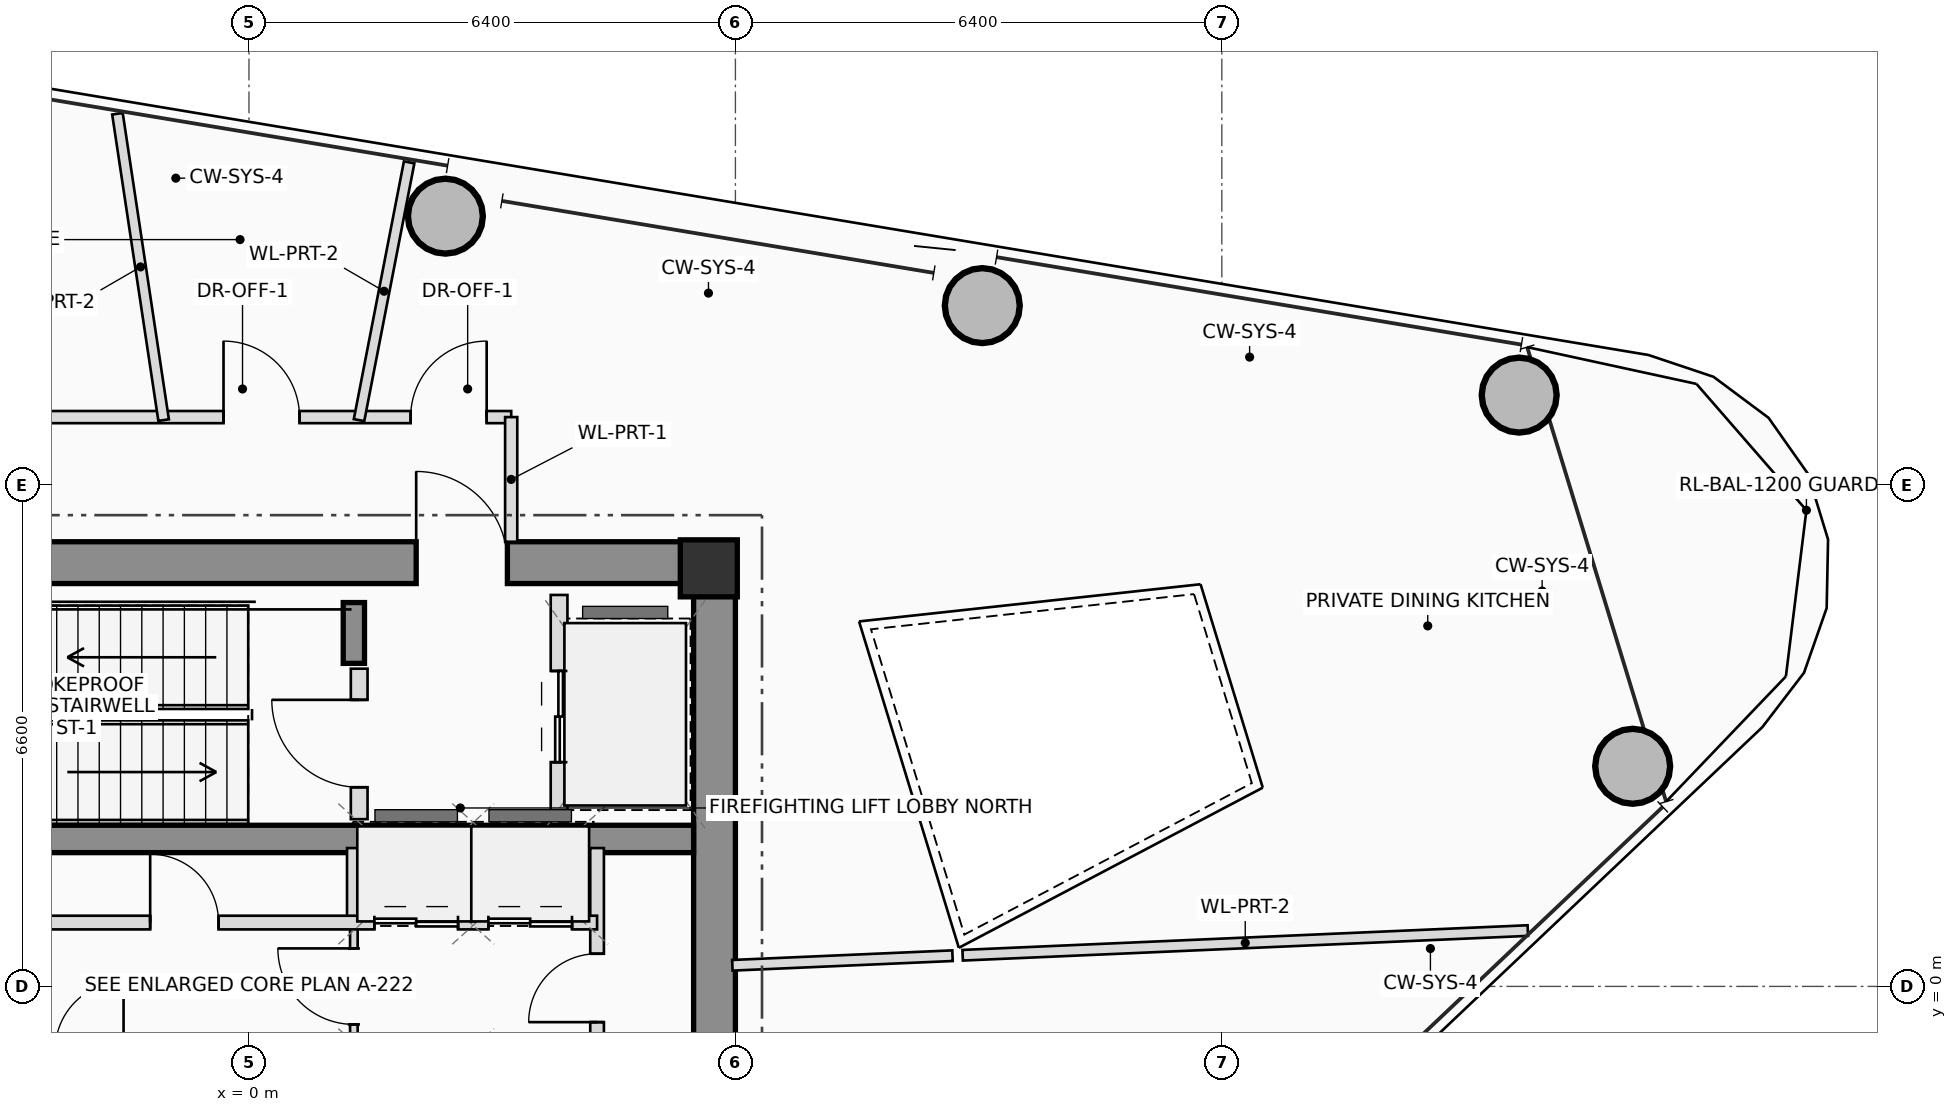
"""IFC4 building model, lengths in metres.
Left out: names, types, materials, properties, quantities, classifications, styles, units other than length and angle.
Written with IfcOpenShell. Run it as: python <this file> out.ifc"""

import sys

from ifc_helpers import new_model, si_unit, direction, frame, frame_2d, origin, origin_2d, place, context, subcontext, project, spatial, rectangle, hollow_circle, extrude, source, transform, mapped, element, fill, save


model = new_model("IFC4")
c1 = context("Model", 3, precision=1e-05, world=origin(), true_north=direction((0.0, 1.0)))
c2 = subcontext(c1, "Body", "Model", "MODEL_VIEW")
j1 = project(units=[si_unit("LENGTHUNIT", "METRE"), si_unit("PLANEANGLEUNIT", "RADIAN")], contexts=[c1])
p1 = place(None, origin())
s1 = spatial("IfcSite", under=j1, at=p1, CompositionType="ELEMENT")
p2 = place(p1, origin())
s2 = spatial("IfcBuilding", under=s1, at=p2, CompositionType="ELEMENT")
p3 = place(p2, frame((0.0, 0.0, 242.25)))
s3 = spatial("IfcBuildingStorey", under=s2, at=p3, CompositionType="ELEMENT", Elevation=242.25)
m1 = source(origin(), c2, "Body", "SweptSolid", [
    extrude(rectangle(XDim=0.75, YDim=0.75, at=origin_2d()), origin(), (0.0, 0.0, 1.0), 3.4),
])
p4 = place(p3, frame((6.05, 5.5, 0.0), z_axis=(0.0, 0.0, 1.0), x_axis=(1.0, 0.0, 0.0)))
e1 = element("IfcColumn", 1, at=p4, inside=s3, PredefinedType="COLUMN", context=c2, shape_type="MappedRepresentation", body=[
    mapped(m1, transform((0.0, 0.0, 0.0), scale=1.0)),
])
p5 = place(p3, frame((-6.4, 5.575, 0.0), z_axis=(0.0, 0.0, 1.0), x_axis=(1.0, 0.0, 0.0)))
e2 = element("IfcWall", 2, at=p5, inside=s3, PredefinedType="SHEAR", context=c2, shape_type="SweptSolid", body=[
    extrude(rectangle(XDim=12.8, YDim=0.55, at=frame_2d((6.4, 0.0))), origin(), (0.0, 0.0, 1.0), 3.4),
])
p6 = place(p5, frame((8.6, 0.0, 0.0)))
e3 = element("IfcOpeningElement", 3, at=p6, cuts=e2, PredefinedType="OPENING", context=c2, shape_type="SweptSolid", body=[
    extrude(rectangle(XDim=1.2, YDim=2.2, at=frame_2d((0.6, 1.1))), frame((0.0, 0.285, 0.0), z_axis=(0.0, -1.0, 0.0), x_axis=(1.0, 0.0, 0.0)), (0.0, 0.0, 1.0), 0.57),
])
p7 = place(p3, frame((6.125, -5.3, 0.0), z_axis=(0.0, 0.0, 1.0), x_axis=(0.0, 1.0, 0.0)))
e4 = element("IfcWall", 4, at=p7, inside=s3, PredefinedType="SHEAR", context=c2, shape_type="SweptSolid", body=[
    extrude(rectangle(XDim=10.6, YDim=0.55, at=frame_2d((5.3, 0.0))), origin(), (0.0, 0.0, 1.0), 3.4),
])
p8 = place(p3, frame((-5.85, 1.94, 0.0), z_axis=(0.0, 0.0, 1.0), x_axis=(1.0, 0.0, 0.0)))
e5 = element("IfcWall", 5, at=p8, inside=s3, PredefinedType="SHEAR", context=c2, shape_type="SweptSolid", body=[
    extrude(rectangle(XDim=11.7, YDim=0.36, at=frame_2d((5.85, 0.0))), origin(), (0.0, 0.0, 1.0), 3.4),
])
p9 = place(p3, frame((1.38, 4.25, 0.0), z_axis=(0.0, 0.0, 1.0), x_axis=(0.0, 1.0, 0.0)))
e6 = element("IfcWall", 6, at=p9, inside=s3, PredefinedType="SHEAR", context=c2, shape_type="SweptSolid", body=[
    extrude(rectangle(XDim=0.8, YDim=0.28, at=frame_2d((0.4, 0.0))), origin(), (0.0, 0.0, 1.0), 3.4),
])
m2 = source(origin(), c2, "Body", "SweptSolid", [
    extrude(hollow_circle(Radius=0.5, WallThickness=0.04, at=origin_2d()), origin(), (0.0, 0.0, 1.0), 3.4),
])
for number, where, z_axis, x_axis in (
    (7, (18.205, 2.896, 0.0), (0.0, 0.0, 1.0), (1.0, 0.0, 0.0)),
    (8, (16.712, 7.779, 0.0), (0.0, 0.0, 1.0), (1.0, 0.0, 0.0)),
    (9, (9.648, 8.957, 0.0), (0.0, 0.0, 1.0), (1.0, 0.0, 0.0)),
    (10, (2.584, 10.134, 0.0), (0.0, 0.0, 1.0), (1.0, 0.0, 0.0)),
):
    element("IfcColumn", number, at=place(p3, frame(where, z_axis=z_axis, x_axis=x_axis)), inside=s3, PredefinedType="COLUMN", context=c2, shape_type="MappedRepresentation", body=[
        mapped(m2, transform((0.0, 0.0, 0.0), scale=1.0)),
    ])
p10 = place(p3, frame((1.45, 2.2, 0.0), z_axis=(0.0, 0.0, 1.0), x_axis=(0.0, 1.0, 0.0)))
e11 = element("IfcWall", 11, at=p10, inside=s3, PredefinedType="PLUMBINGWALL", context=c2, shape_type="SweptSolid", body=[
    extrude(rectangle(XDim=1.98, YDim=0.22, at=frame_2d((0.99, 0.0))), origin(), (0.0, 0.0, 1.0), 3.2),
])
p11 = place(p10, frame((0.42, 0.0, 0.0)))
e12 = element("IfcOpeningElement", 12, at=p11, cuts=e11, PredefinedType="OPENING", context=c2, shape_type="SweptSolid", body=[
    extrude(rectangle(XDim=1.15, YDim=2.15, at=frame_2d((0.575, 1.075))), frame((0.0, 0.12, 0.0), z_axis=(0.0, -1.0, 0.0), x_axis=(1.0, 0.0, 0.0)), (0.0, 0.0, 1.0), 0.24),
])
p12 = place(p3, frame((4.08, 2.2, 0.0), z_axis=(0.0, 0.0, 1.0), x_axis=(0.0, 1.0, 0.0)))
e13 = element("IfcWall", 13, at=p12, inside=s3, PredefinedType="PLUMBINGWALL", context=c2, shape_type="SweptSolid", body=[
    extrude(rectangle(XDim=2.95, YDim=0.22, at=frame_2d((1.475, 0.0))), origin(), (0.0, 0.0, 1.0), 3.2),
])
p13 = place(p12, frame((0.75, 0.0, 0.0)))
e14 = element("IfcOpeningElement", 14, at=p13, cuts=e13, PredefinedType="OPENING", context=c2, shape_type="SweptSolid", body=[
    extrude(rectangle(XDim=1.2, YDim=2.25, at=frame_2d((0.6, 1.125))), frame((0.0, 0.12, 0.0), z_axis=(0.0, -1.0, 0.0), x_axis=(1.0, 0.0, 0.0)), (0.0, 0.0, 1.0), 0.24),
])
p14 = place(p3, frame((1.38, -0.84, 0.0), z_axis=(0.0, 0.0, 1.0), x_axis=(0.0, 1.0, 0.0)))
e15 = element("IfcWall", 15, at=p14, inside=s3, PredefinedType="PARTITIONING", context=c2, shape_type="SweptSolid", body=[
    extrude(rectangle(XDim=1.68, YDim=0.1, at=frame_2d((0.84, 0.0))), origin(), (0.0, 0.0, 1.0), 3.2),
])
p15 = place(p14, frame((0.34, 0.0, 0.0)))
e16 = element("IfcOpeningElement", 16, at=p15, cuts=e15, PredefinedType="OPENING", context=c2, shape_type="SweptSolid", body=[
    extrude(rectangle(XDim=1.0, YDim=2.25, at=frame_2d((0.5, 1.125))), frame((0.0, 0.06, 0.0), z_axis=(0.0, -1.0, 0.0), x_axis=(1.0, 0.0, 0.0)), (0.0, 0.0, 1.0), 0.12),
])
for number, where, z_axis, x_axis in (
    (17, (1.38, 0.84, 0.0), (0.0, 0.0, 1.0), (0.0, 1.0, 0.0)),
    (18, (3.02, 0.84, 0.0), (0.0, 0.0, 1.0), (0.0, 1.0, 0.0)),
    (19, (4.38, 0.84, 0.0), (0.0, 0.0, 1.0), (0.0, 1.0, 0.0)),
):
    element("IfcWall", number, at=place(p3, frame(where, z_axis=z_axis, x_axis=x_axis)), inside=s3, PredefinedType="PLUMBINGWALL", context=c2, shape_type="SweptSolid", body=[
        extrude(rectangle(XDim=0.98, YDim=0.18, at=frame_2d((0.49, 0.0))), origin(), (0.0, 0.0, 1.0), 3.2),
    ])
p16 = place(p3, frame((4.58, -1.82, 0.0), z_axis=(0.0, 0.0, 1.0), x_axis=(0.0, 1.0, 0.0)))
e20 = element("IfcWall", 20, at=p16, inside=s3, PredefinedType="PLUMBINGWALL", context=c2, shape_type="SweptSolid", body=[
    extrude(rectangle(XDim=3.64, YDim=0.18, at=frame_2d((1.82, 0.0))), origin(), (0.0, 0.0, 1.0), 3.2),
])
p17 = place(p16, frame((1.35, 0.0, 0.0)))
e21 = element("IfcOpeningElement", 21, at=p17, cuts=e20, PredefinedType="OPENING", context=c2, shape_type="SweptSolid", body=[
    extrude(rectangle(XDim=0.9, YDim=2.05, at=frame_2d((0.45, 1.025))), frame((0.0, 0.1, 0.0), z_axis=(0.0, -1.0, 0.0), x_axis=(1.0, 0.0, 0.0)), (0.0, 0.0, 1.0), 0.2),
])
p18 = place(p3, frame((-5.68, 0.84, 0.0), z_axis=(0.0, 0.0, 1.0), x_axis=(1.0, 0.0, 0.0)))
e22 = element("IfcWall", 22, at=p18, inside=s3, PredefinedType="PLUMBINGWALL", context=c2, shape_type="SweptSolid", body=[
    extrude(rectangle(XDim=10.26, YDim=0.18, at=frame_2d((5.13, 0.0))), origin(), (0.0, 0.0, 1.0), 3.2),
])
p19 = place(p18, frame((0.91, 0.0, 0.0)))
e23 = element("IfcOpeningElement", 23, at=p19, cuts=e22, PredefinedType="OPENING", context=c2, shape_type="SweptSolid", body=[
    extrude(rectangle(XDim=0.9, YDim=2.05, at=frame_2d((0.45, 1.025))), frame((0.0, 0.1, 0.0), z_axis=(0.0, -1.0, 0.0), x_axis=(1.0, 0.0, 0.0)), (0.0, 0.0, 1.0), 0.2),
])
p20 = place(p18, frame((4.38, 0.0, 0.0)))
e24 = element("IfcOpeningElement", 24, at=p20, cuts=e22, PredefinedType="OPENING", context=c2, shape_type="SweptSolid", body=[
    extrude(rectangle(XDim=0.9, YDim=2.05, at=frame_2d((0.45, 1.025))), frame((0.0, 0.1, 0.0), z_axis=(0.0, -1.0, 0.0), x_axis=(1.0, 0.0, 0.0)), (0.0, 0.0, 1.0), 0.2),
])
p21 = place(p18, frame((7.33, 0.0, 0.0)))
e25 = element("IfcOpeningElement", 25, at=p21, cuts=e22, PredefinedType="OPENING", context=c2, shape_type="SweptSolid", body=[
    extrude(rectangle(XDim=1.1, YDim=2.2, at=frame_2d((0.55, 1.1))), frame((0.0, 0.1, 0.0), z_axis=(0.0, -1.0, 0.0), x_axis=(1.0, 0.0, 0.0)), (0.0, 0.0, 1.0), 0.2),
])
p22 = place(p18, frame((8.83, 0.0, 0.0)))
e26 = element("IfcOpeningElement", 26, at=p22, cuts=e22, PredefinedType="OPENING", context=c2, shape_type="SweptSolid", body=[
    extrude(rectangle(XDim=1.1, YDim=2.2, at=frame_2d((0.55, 1.1))), frame((0.0, 0.1, 0.0), z_axis=(0.0, -1.0, 0.0), x_axis=(1.0, 0.0, 0.0)), (0.0, 0.0, 1.0), 0.2),
])
p23 = place(p3, frame((-6.36, 7.49, 0.0), z_axis=(0.0, 0.0, 1.0), x_axis=(1.0, 0.0, 0.0)))
e27 = element("IfcWall", 27, at=p23, inside=s3, PredefinedType="PARTITIONING", context=c2, shape_type="SweptSolid", body=[
    extrude(rectangle(XDim=9.81, YDim=0.16, at=frame_2d((4.905, 0.0))), origin(), (0.0, 0.0, 1.0), 2.605),
])
p24 = place(p23, frame((6.025, 0.0, 0.0)))
e28 = element("IfcOpeningElement", 28, at=p24, cuts=e27, PredefinedType="OPENING", context=c2, shape_type="SweptSolid", body=[
    extrude(rectangle(XDim=1.0, YDim=2.25, at=frame_2d((0.5, 1.125))), frame((0.0, 0.09, 0.0), z_axis=(0.0, -1.0, 0.0), x_axis=(1.0, 0.0, 0.0)), (0.0, 0.0, 1.0), 0.18),
])
p25 = place(p23, frame((8.487, 0.0, 0.0)))
e29 = element("IfcOpeningElement", 29, at=p25, cuts=e27, PredefinedType="OPENING", context=c2, shape_type="SweptSolid", body=[
    extrude(rectangle(XDim=1.0, YDim=2.25, at=frame_2d((0.5, 1.125))), frame((0.0, 0.09, 0.0), z_axis=(0.0, -1.0, 0.0), x_axis=(1.0, 0.0, 0.0)), (0.0, 0.0, 1.0), 0.18),
])
p26 = place(p3, frame((3.45, 7.49, 0.0), z_axis=(0.0, 0.0, 1.0), x_axis=(0.0, -1.0, 0.0)))
e30 = element("IfcWall", 30, at=p26, inside=s3, PredefinedType="PARTITIONING", context=c2, shape_type="SweptSolid", body=[
    extrude(rectangle(XDim=1.64, YDim=0.16, at=frame_2d((0.82, 0.0))), origin(), (0.0, 0.0, 1.0), 3.2),
])
p27 = place(p3, frame((6.36, 0.278, 0.0), z_axis=(0.0, 0.0, 1.0), x_axis=(0.999048037217, 0.043623609819, 0.0)))
e31 = element("IfcWall", 31, at=p27, inside=s3, PredefinedType="PARTITIONING", context=c2, shape_type="SweptSolid", body=[
    extrude(rectangle(XDim=2.899, YDim=0.14, at=frame_2d((1.449, 0.0))), origin(), (0.0, 0.0, 1.0), 3.2),
])
p28 = place(p3, frame((9.39, 0.41, 0.0), z_axis=(0.0, 0.0, 1.0), x_axis=(0.999047971421, 0.043625116619, 0.0)))
e32 = element("IfcWall", 32, at=p28, inside=s3, PredefinedType="PARTITIONING", context=c2, shape_type="SweptSolid", body=[
    extrude(rectangle(XDim=7.443, YDim=0.14, at=frame_2d((3.722, 0.0))), origin(), (0.0, 0.0, 1.0), 2.605),
])
p29 = place(p3, frame((1.448, 7.45, 0.0), z_axis=(0.0, 0.0, 1.0), x_axis=(0.19085452876, 0.981618331558, 0.0)))
e33 = element("IfcWall", 33, at=p29, inside=s3, PredefinedType="PARTITIONING", context=c2, shape_type="SweptSolid", body=[
    extrude(rectangle(XDim=3.455, YDim=0.14, at=frame_2d((1.728, 0.0))), origin(), (0.0, 0.0, 1.0), 2.765),
])
p30 = place(p3, frame((-1.123, 7.45, 0.0), z_axis=(0.0, 0.0, 1.0), x_axis=(-0.149063767164, 0.988827585234, 0.0)))
e34 = element("IfcWall", 34, at=p30, inside=s3, PredefinedType="PARTITIONING", context=c2, shape_type="SweptSolid", body=[
    extrude(rectangle(XDim=4.077, YDim=0.14, at=frame_2d((2.038, 0.0))), origin(), (0.0, 0.0, 1.0), 2.765),
])
p31 = place(p6, origin())
e35 = element("IfcDoor", 35, at=p31, inside=s3, OperationType="SINGLE_SWING_LEFT", PredefinedType="DOOR", context=c2, shape_type="SweptSolid", body=[
    extrude(rectangle(XDim=1.2, YDim=2.2, at=frame_2d((0.6, 1.1))), frame((0.0, 0.025, 0.0), z_axis=(0.0, -1.0, 0.0), x_axis=(1.0, 0.0, 0.0)), (0.0, 0.0, 1.0), 0.05),
])
fill(e3, e35)
p32 = place(p11, origin())
e36 = element("IfcDoor", 36, at=p32, inside=s3, OperationType="SINGLE_SWING_RIGHT", PredefinedType="DOOR", context=c2, shape_type="SweptSolid", body=[
    extrude(rectangle(XDim=1.15, YDim=2.15, at=frame_2d((0.575, 1.075))), frame((0.0, 0.025, 0.0), z_axis=(0.0, -1.0, 0.0), x_axis=(1.0, 0.0, 0.0)), (0.0, 0.0, 1.0), 0.05),
])
fill(e12, e36)
p33 = place(p13, origin())
e37 = element("IfcDoor", 37, at=p33, inside=s3, OperationType="DOUBLE_DOOR_SLIDING", PredefinedType="DOOR", context=c2, shape_type="SweptSolid", body=[
    extrude(rectangle(XDim=1.2, YDim=2.25, at=frame_2d((0.6, 1.125))), frame((0.0, 0.025, 0.0), z_axis=(0.0, -1.0, 0.0), x_axis=(1.0, 0.0, 0.0)), (0.0, 0.0, 1.0), 0.05),
])
fill(e14, e37)
p34 = place(p15, origin())
e38 = element("IfcDoor", 38, at=p34, inside=s3, OperationType="SINGLE_SWING_RIGHT", PredefinedType="DOOR", context=c2, shape_type="SweptSolid", body=[
    extrude(rectangle(XDim=1.0, YDim=2.25, at=frame_2d((0.5, 1.125))), frame((0.0, 0.025, 0.0), z_axis=(0.0, -1.0, 0.0), x_axis=(1.0, 0.0, 0.0)), (0.0, 0.0, 1.0), 0.05),
])
fill(e16, e38)
p35 = place(p17, origin())
e39 = element("IfcDoor", 39, at=p35, inside=s3, OperationType="SINGLE_SWING_LEFT", PredefinedType="DOOR", context=c2, shape_type="SweptSolid", body=[
    extrude(rectangle(XDim=0.9, YDim=2.05, at=frame_2d((0.45, 1.025))), frame((0.0, 0.025, 0.0), z_axis=(0.0, -1.0, 0.0), x_axis=(1.0, 0.0, 0.0)), (0.0, 0.0, 1.0), 0.05),
])
fill(e21, e39)
p36 = place(p20, origin())
e40 = element("IfcDoor", 40, at=p36, inside=s3, OperationType="SINGLE_SWING_LEFT", PredefinedType="DOOR", context=c2, shape_type="SweptSolid", body=[
    extrude(rectangle(XDim=0.9, YDim=2.05, at=frame_2d((0.45, 1.025))), frame((0.0, 0.025, 0.0), z_axis=(0.0, -1.0, 0.0), x_axis=(1.0, 0.0, 0.0)), (0.0, 0.0, 1.0), 0.05),
])
fill(e24, e40)
p37 = place(p21, origin())
e41 = element("IfcDoor", 41, at=p37, inside=s3, OperationType="DOUBLE_DOOR_SLIDING", PredefinedType="DOOR", context=c2, shape_type="SweptSolid", body=[
    extrude(rectangle(XDim=1.1, YDim=2.2, at=frame_2d((0.55, 1.1))), frame((0.0, 0.025, 0.0), z_axis=(0.0, -1.0, 0.0), x_axis=(1.0, 0.0, 0.0)), (0.0, 0.0, 1.0), 0.05),
])
fill(e25, e41)
p38 = place(p22, origin())
e42 = element("IfcDoor", 42, at=p38, inside=s3, OperationType="DOUBLE_DOOR_SLIDING", PredefinedType="DOOR", context=c2, shape_type="SweptSolid", body=[
    extrude(rectangle(XDim=1.1, YDim=2.2, at=frame_2d((0.55, 1.1))), frame((0.0, 0.025, 0.0), z_axis=(0.0, -1.0, 0.0), x_axis=(1.0, 0.0, 0.0)), (0.0, 0.0, 1.0), 0.05),
])
fill(e26, e42)
p39 = place(p24, origin())
e43 = element("IfcDoor", 43, at=p39, inside=s3, OperationType="SINGLE_SWING_LEFT", PredefinedType="DOOR", context=c2, shape_type="SweptSolid", body=[
    extrude(rectangle(XDim=1.0, YDim=2.25, at=frame_2d((0.5, 1.125))), frame((0.0, 0.025, 0.0), z_axis=(0.0, -1.0, 0.0), x_axis=(1.0, 0.0, 0.0)), (0.0, 0.0, 1.0), 0.05),
])
fill(e28, e43)
p40 = place(p25, origin())
e44 = element("IfcDoor", 44, at=p40, inside=s3, OperationType="SINGLE_SWING_RIGHT", PredefinedType="DOOR", context=c2, shape_type="SweptSolid", body=[
    extrude(rectangle(XDim=1.0, YDim=2.25, at=frame_2d((0.5, 1.125))), frame((0.0, 0.025, 0.0), z_axis=(0.0, -1.0, 0.0), x_axis=(1.0, 0.0, 0.0)), (0.0, 0.0, 1.0), 0.05),
])
fill(e29, e44)
save(model, sys.argv[1])
